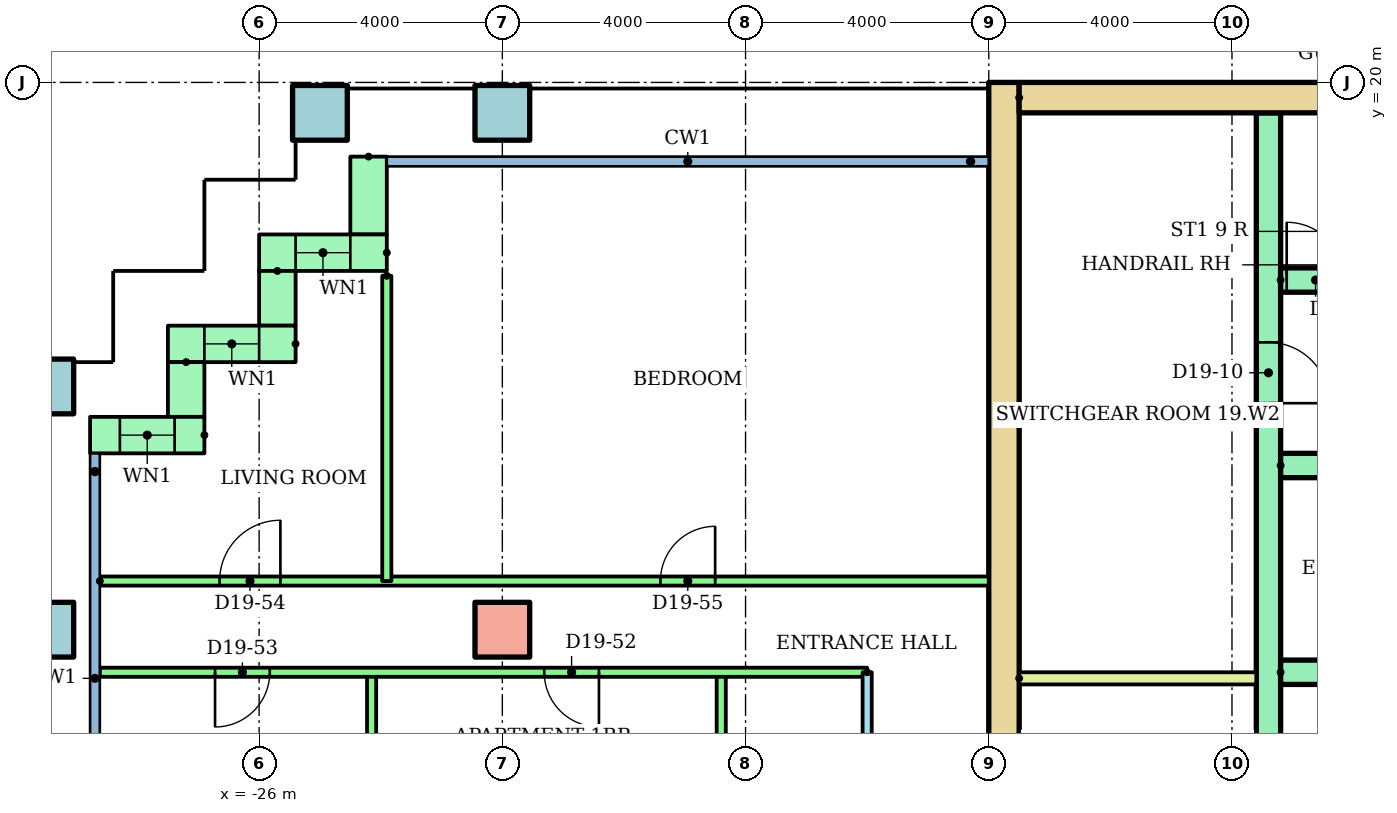
"""IFC4 building model, lengths in metres.
Left out: names, types, materials, properties, quantities, classifications, styles, units other than length and angle.
Written with IfcOpenShell. Run it as: python <this file> out.ifc"""

import sys

from ifc_helpers import new_model, si_unit, direction, frame, frame_2d, origin, origin_2d, place, context, subcontext, project, spatial, rectangle, hollow_rectangle, extrude, element, fill, save


model = new_model("IFC4")
c1 = context("Model", 3, precision=1e-05, world=origin(), true_north=direction((0.0, 1.0)))
c2 = subcontext(c1, "Body", "Model", "MODEL_VIEW")
j1 = project(units=[si_unit("LENGTHUNIT", "METRE"), si_unit("PLANEANGLEUNIT", "RADIAN")], contexts=[c1])
p1 = place(None, origin())
s1 = spatial("IfcSite", under=j1, at=p1, CompositionType="ELEMENT")
p2 = place(p1, origin())
s2 = spatial("IfcBuilding", under=s1, at=p2, CompositionType="ELEMENT")
p3 = place(p2, frame((0.0, 0.0, 77.5)))
s3 = spatial("IfcBuildingStorey", under=s2, at=p3, CompositionType="ELEMENT", Elevation=77.5)
p4 = place(p3, frame((-29.5, 11.0, 0.0)))
e1 = element("IfcColumn", 1, at=p4, inside=s3, PredefinedType="COLUMN", context=c2, shape_type="SweptSolid", body=[
    extrude(hollow_rectangle(XDim=0.9, YDim=0.9, WallThickness=0.045, at=origin_2d()), origin(), (0.0, 0.0, 1.0), 3.2),
])
p5 = place(p3, frame((-22.0, 11.0, 0.0)))
e2 = element("IfcColumn", 2, at=p5, inside=s3, PredefinedType="COLUMN", context=c2, shape_type="SweptSolid", body=[
    extrude(rectangle(XDim=0.9, YDim=0.9, at=origin_2d()), origin(), (0.0, 0.0, 1.0), 3.2),
])
for number, where in (
    (3, (-29.5, 15.0, 0.0)),
    (4, (-25.0, 19.5, 0.0)),
    (5, (-22.0, 19.5, 0.0)),
):
    element("IfcColumn", number, at=place(p3, frame(where)), inside=s3, PredefinedType="COLUMN", context=c2, shape_type="SweptSolid", body=[
        extrude(hollow_rectangle(XDim=0.9, YDim=0.9, WallThickness=0.045, at=origin_2d()), origin(), (0.0, 0.0, 1.0), 3.2),
    ])
p6 = place(p3, frame((-24.2, 18.78, 0.0), z_axis=(0.0, 0.0, 1.0), x_axis=(0.0, -1.0, 0.0)))
e6 = element("IfcWall", 6, at=p6, inside=s3, PredefinedType="STANDARD", context=c2, shape_type="SweptSolid", body=[
    extrude(rectangle(XDim=1.28, YDim=0.6, at=frame_2d((0.64, 0.0))), origin(), (0.0, 0.0, 1.0), 2.92),
])
p7 = place(p3, frame((-23.9, 17.2, 0.0), z_axis=(0.0, 0.0, 1.0), x_axis=(-1.0, 0.0, 0.0)))
e7 = element("IfcWall", 7, at=p7, inside=s3, PredefinedType="STANDARD", context=c2, shape_type="SweptSolid", body=[
    extrude(rectangle(XDim=2.1, YDim=0.6, at=frame_2d((1.05, 0.0))), origin(), (0.0, 0.0, 1.0), 2.92),
])
p8 = place(p7, frame((0.6, 0.0, 0.9)))
e8 = element("IfcOpeningElement", 8, at=p8, cuts=e7, PredefinedType="OPENING", context=c2, shape_type="SweptSolid", body=[
    extrude(rectangle(XDim=0.9, YDim=1.5, at=frame_2d((0.45, 0.75))), frame((0.0, 0.31, 0.0), z_axis=(0.0, -1.0, 0.0), x_axis=(1.0, 0.0, 0.0)), (0.0, 0.0, 1.0), 0.62),
])
p9 = place(p3, frame((-25.7, 16.9, 0.0), z_axis=(0.0, 0.0, 1.0), x_axis=(0.0, -1.0, 0.0)))
e9 = element("IfcWall", 9, at=p9, inside=s3, PredefinedType="STANDARD", context=c2, shape_type="SweptSolid", body=[
    extrude(rectangle(XDim=0.9, YDim=0.6, at=frame_2d((0.45, 0.0))), origin(), (0.0, 0.0, 1.0), 2.92),
])
p10 = place(p3, frame((-25.4, 15.7, 0.0), z_axis=(0.0, 0.0, 1.0), x_axis=(-1.0, 0.0, 0.0)))
e10 = element("IfcWall", 10, at=p10, inside=s3, PredefinedType="STANDARD", context=c2, shape_type="SweptSolid", body=[
    extrude(rectangle(XDim=2.1, YDim=0.6, at=frame_2d((1.05, 0.0))), origin(), (0.0, 0.0, 1.0), 2.92),
])
p11 = place(p10, frame((0.6, 0.0, 0.9)))
e11 = element("IfcOpeningElement", 11, at=p11, cuts=e10, PredefinedType="OPENING", context=c2, shape_type="SweptSolid", body=[
    extrude(rectangle(XDim=0.9, YDim=1.5, at=frame_2d((0.45, 0.75))), frame((0.0, 0.31, 0.0), z_axis=(0.0, -1.0, 0.0), x_axis=(1.0, 0.0, 0.0)), (0.0, 0.0, 1.0), 0.62),
])
p12 = place(p3, frame((-27.2, 15.4, 0.0), z_axis=(0.0, 0.0, 1.0), x_axis=(0.0, -1.0, 0.0)))
e12 = element("IfcWall", 12, at=p12, inside=s3, PredefinedType="STANDARD", context=c2, shape_type="SweptSolid", body=[
    extrude(rectangle(XDim=0.9, YDim=0.6, at=frame_2d((0.45, 0.0))), origin(), (0.0, 0.0, 1.0), 2.92),
])
p13 = place(p3, frame((-26.9, 14.2, 0.0), z_axis=(0.0, 0.0, 1.0), x_axis=(-1.0, 0.0, 0.0)))
e13 = element("IfcWall", 13, at=p13, inside=s3, PredefinedType="STANDARD", context=c2, shape_type="SweptSolid", body=[
    extrude(rectangle(XDim=1.88, YDim=0.6, at=frame_2d((0.94, 0.0))), origin(), (0.0, 0.0, 1.0), 2.92),
])
p14 = place(p13, frame((0.49, 0.0, 0.9)))
e14 = element("IfcOpeningElement", 14, at=p14, cuts=e13, PredefinedType="OPENING", context=c2, shape_type="SweptSolid", body=[
    extrude(rectangle(XDim=0.9, YDim=1.5, at=frame_2d((0.45, 0.75))), frame((0.0, 0.31, 0.0), z_axis=(0.0, -1.0, 0.0), x_axis=(1.0, 0.0, 0.0)), (0.0, 0.0, 1.0), 0.62),
])
p15 = place(p3, frame((-13.75, 3.0, 0.0), z_axis=(0.0, 0.0, 1.0), x_axis=(0.0, 1.0, 0.0)))
e15 = element("IfcWall", 15, at=p15, inside=s3, PredefinedType="SHEAR", context=c2, shape_type="SweptSolid", body=[
    extrude(rectangle(XDim=17.0, YDim=0.5, at=frame_2d((8.5, 0.0))), origin(), (0.0, 0.0, 1.0), 2.92),
])
p16 = place(p3, frame((-13.5, 19.75, 0.0)))
e16 = element("IfcWall", 16, at=p16, inside=s3, PredefinedType="SHEAR", context=c2, shape_type="SweptSolid", body=[
    extrude(rectangle(XDim=27.0, YDim=0.5, at=frame_2d((13.5, 0.0))), origin(), (0.0, 0.0, 1.0), 2.92),
])
p17 = place(p3, frame((-9.4, 6.8, 0.0), z_axis=(0.0, 0.0, 1.0), x_axis=(0.0, 1.0, 0.0)))
e17 = element("IfcWall", 17, at=p17, inside=s3, PredefinedType="SHEAR", context=c2, shape_type="SweptSolid", body=[
    extrude(rectangle(XDim=12.7, YDim=0.4, at=frame_2d((6.35, 0.0))), origin(), (0.0, 0.0, 1.0), 2.92),
])
p18 = place(p17, frame((1.15, 0.0, 0.0)))
e18 = element("IfcOpeningElement", 18, at=p18, cuts=e17, PredefinedType="OPENING", context=c2, shape_type="SweptSolid", body=[
    extrude(rectangle(XDim=1.0, YDim=2.1, at=frame_2d((0.5, 1.05))), frame((0.0, 0.21, 0.0), z_axis=(0.0, -1.0, 0.0), x_axis=(1.0, 0.0, 0.0)), (0.0, 0.0, 1.0), 0.42),
])
p19 = place(p17, frame((7.925, 0.0, 0.0)))
e19 = element("IfcOpeningElement", 19, at=p19, cuts=e17, PredefinedType="OPENING", context=c2, shape_type="SweptSolid", body=[
    extrude(rectangle(XDim=1.0, YDim=2.1, at=frame_2d((0.5, 1.05))), frame((0.0, 0.21, 0.0), z_axis=(0.0, -1.0, 0.0), x_axis=(1.0, 0.0, 0.0)), (0.0, 0.0, 1.0), 0.42),
])
p20 = place(p3, frame((-9.2, 10.3, 0.0)))
e20 = element("IfcWall", 20, at=p20, inside=s3, PredefinedType="SHEAR", context=c2, shape_type="SweptSolid", body=[
    extrude(rectangle(XDim=8.0, YDim=0.4, at=frame_2d((4.0, 0.0))), origin(), (0.0, 0.0, 1.0), 2.92),
])
p21 = place(p20, frame((2.033, 0.0, 0.0)))
e21 = element("IfcOpeningElement", 21, at=p21, cuts=e20, PredefinedType="OPENING", context=c2, shape_type="SweptSolid", body=[
    extrude(rectangle(XDim=1.0, YDim=2.1, at=frame_2d((0.5, 1.05))), frame((0.0, 0.21, 0.0), z_axis=(0.0, -1.0, 0.0), x_axis=(1.0, 0.0, 0.0)), (0.0, 0.0, 1.0), 0.42),
])
p22 = place(p20, frame((6.133, 0.0, 0.0)))
e22 = element("IfcOpeningElement", 22, at=p22, cuts=e20, PredefinedType="OPENING", context=c2, shape_type="SweptSolid", body=[
    extrude(rectangle(XDim=1.0, YDim=2.1, at=frame_2d((0.5, 1.05))), frame((0.0, 0.21, 0.0), z_axis=(0.0, -1.0, 0.0), x_axis=(1.0, 0.0, 0.0)), (0.0, 0.0, 1.0), 0.42),
])
p23 = place(p3, frame((-9.2, 13.7, 0.0)))
e23 = element("IfcWall", 23, at=p23, inside=s3, PredefinedType="SHEAR", context=c2, shape_type="SweptSolid", body=[
    extrude(rectangle(XDim=8.0, YDim=0.4, at=frame_2d((4.0, 0.0))), origin(), (0.0, 0.0, 1.0), 2.92),
])
p24 = place(p3, frame((-9.2, 16.75, 0.0)))
e24 = element("IfcWall", 24, at=p24, inside=s3, PredefinedType="SHEAR", context=c2, shape_type="SweptSolid", body=[
    extrude(rectangle(XDim=18.4, YDim=0.4, at=frame_2d((9.2, 0.0))), origin(), (0.0, 0.0, 1.0), 2.92),
])
p25 = place(p24, frame((0.1, 0.0, 0.0)))
e25 = element("IfcOpeningElement", 25, at=p25, cuts=e24, PredefinedType="OPENING", context=c2, shape_type="SweptSolid", body=[
    extrude(rectangle(XDim=0.95, YDim=2.1, at=frame_2d((0.475, 1.05))), frame((0.0, 0.21, 0.0), z_axis=(0.0, -1.0, 0.0), x_axis=(1.0, 0.0, 0.0)), (0.0, 0.0, 1.0), 0.42),
])
p26 = place(p24, frame((6.1, 0.0, 0.0)))
e26 = element("IfcOpeningElement", 26, at=p26, cuts=e24, PredefinedType="OPENING", context=c2, shape_type="SweptSolid", body=[
    extrude(rectangle(XDim=0.95, YDim=2.1, at=frame_2d((0.475, 1.05))), frame((0.0, 0.21, 0.0), z_axis=(0.0, -1.0, 0.0), x_axis=(1.0, 0.0, 0.0)), (0.0, 0.0, 1.0), 0.42),
])
p27 = place(p24, frame((12.1, 0.0, 0.0)))
e27 = element("IfcOpeningElement", 27, at=p27, cuts=e24, PredefinedType="OPENING", context=c2, shape_type="SweptSolid", body=[
    extrude(rectangle(XDim=0.95, YDim=2.1, at=frame_2d((0.475, 1.05))), frame((0.0, 0.21, 0.0), z_axis=(0.0, -1.0, 0.0), x_axis=(1.0, 0.0, 0.0)), (0.0, 0.0, 1.0), 0.42),
])
p28 = place(p3, frame((-13.5, 10.2, 0.0)))
e28 = element("IfcWall", 28, at=p28, inside=s3, PredefinedType="PARTITIONING", context=c2, shape_type="SweptSolid", body=[
    extrude(rectangle(XDim=3.9, YDim=0.2, at=frame_2d((1.95, 0.0))), origin(), (0.0, 0.0, 1.0), 2.92),
])
p29 = place(p3, frame((-16.0, 1.4, 0.0), z_axis=(0.0, 0.0, 1.0), x_axis=(0.0, 1.0, 0.0)))
e29 = element("IfcWall", 29, at=p29, inside=s3, PredefinedType="PARTITIONING", context=c2, shape_type="SweptSolid", body=[
    extrude(rectangle(XDim=8.9, YDim=0.15, at=frame_2d((4.45, 0.0))), origin(), (0.0, 0.0, 1.0), 2.4),
])
p30 = place(p29, frame((2.05, 0.0, 0.0)))
e30 = element("IfcOpeningElement", 30, at=p30, cuts=e29, PredefinedType="OPENING", context=c2, shape_type="SweptSolid", body=[
    extrude(rectangle(XDim=0.9, YDim=2.1, at=frame_2d((0.45, 1.05))), frame((0.0, 0.085, 0.0), z_axis=(0.0, -1.0, 0.0), x_axis=(1.0, 0.0, 0.0)), (0.0, 0.0, 1.0), 0.17),
])
p31 = place(p29, frame((6.55, 0.0, 0.0)))
e31 = element("IfcOpeningElement", 31, at=p31, cuts=e29, PredefinedType="OPENING", context=c2, shape_type="SweptSolid", body=[
    extrude(rectangle(XDim=0.8, YDim=2.1, at=frame_2d((0.4, 1.05))), frame((0.0, 0.085, 0.0), z_axis=(0.0, -1.0, 0.0), x_axis=(1.0, 0.0, 0.0)), (0.0, 0.0, 1.0), 0.17),
])
for number, where, z_axis, x_axis in (
    (32, (-18.4, 1.4, 0.0), (0.0, 0.0, 1.0), (0.0, 1.0, 0.0)),
    (33, (-24.15, 1.4, 0.0), (0.0, 0.0, 1.0), (0.0, 1.0, 0.0)),
):
    element("IfcWall", number, at=place(p3, frame(where, z_axis=z_axis, x_axis=x_axis)), inside=s3, PredefinedType="PARTITIONING", context=c2, shape_type="SweptSolid", body=[
        extrude(rectangle(XDim=8.9, YDim=0.15, at=frame_2d((4.45, 0.0))), origin(), (0.0, 0.0, 1.0), 2.4),
    ])
p32 = place(p3, frame((-16.0, 10.3, 0.0), z_axis=(0.0, 0.0, 1.0), x_axis=(-1.0, 0.0, 0.0)))
e34 = element("IfcWall", 34, at=p32, inside=s3, PredefinedType="PARTITIONING", context=c2, shape_type="SweptSolid", body=[
    extrude(rectangle(XDim=12.62, YDim=0.15, at=frame_2d((6.31, 0.0))), origin(), (0.0, 0.0, 1.0), 2.4),
])
p33 = place(p32, frame((4.411, 0.0, 0.0)))
e35 = element("IfcOpeningElement", 35, at=p33, cuts=e34, PredefinedType="OPENING", context=c2, shape_type="SweptSolid", body=[
    extrude(rectangle(XDim=0.9, YDim=2.1, at=frame_2d((0.45, 1.05))), frame((0.0, 0.085, 0.0), z_axis=(0.0, -1.0, 0.0), x_axis=(1.0, 0.0, 0.0)), (0.0, 0.0, 1.0), 0.17),
])
p34 = place(p32, frame((9.825, 0.0, 0.0)))
e36 = element("IfcOpeningElement", 36, at=p34, cuts=e34, PredefinedType="OPENING", context=c2, shape_type="SweptSolid", body=[
    extrude(rectangle(XDim=0.9, YDim=2.1, at=frame_2d((0.45, 1.05))), frame((0.0, 0.085, 0.0), z_axis=(0.0, -1.0, 0.0), x_axis=(1.0, 0.0, 0.0)), (0.0, 0.0, 1.0), 0.17),
])
p35 = place(p3, frame((-28.62, 11.8, 0.0)))
e37 = element("IfcWall", 37, at=p35, inside=s3, PredefinedType="PARTITIONING", context=c2, shape_type="SweptSolid", body=[
    extrude(rectangle(XDim=14.62, YDim=0.15, at=frame_2d((7.31, 0.0))), origin(), (0.0, 0.0, 1.0), 2.4),
])
p36 = place(p35, frame((1.97, 0.0, 0.0)))
e38 = element("IfcOpeningElement", 38, at=p36, cuts=e37, PredefinedType="OPENING", context=c2, shape_type="SweptSolid", body=[
    extrude(rectangle(XDim=1.0, YDim=2.1, at=frame_2d((0.5, 1.05))), frame((0.0, 0.085, 0.0), z_axis=(0.0, -1.0, 0.0), x_axis=(1.0, 0.0, 0.0)), (0.0, 0.0, 1.0), 0.17),
])
p37 = place(p35, frame((9.22, 0.0, 0.0)))
e39 = element("IfcOpeningElement", 39, at=p37, cuts=e37, PredefinedType="OPENING", context=c2, shape_type="SweptSolid", body=[
    extrude(rectangle(XDim=0.9, YDim=2.1, at=frame_2d((0.45, 1.05))), frame((0.0, 0.085, 0.0), z_axis=(0.0, -1.0, 0.0), x_axis=(1.0, 0.0, 0.0)), (0.0, 0.0, 1.0), 0.17),
])
p38 = place(p3, frame((-23.9, 16.82, 0.0), z_axis=(0.0, 0.0, 1.0), x_axis=(0.0, -1.0, 0.0)))
e40 = element("IfcWall", 40, at=p38, inside=s3, PredefinedType="PARTITIONING", context=c2, shape_type="SweptSolid", body=[
    extrude(rectangle(XDim=5.02, YDim=0.15, at=frame_2d((2.51, 0.0))), origin(), (0.0, 0.0, 1.0), 2.4),
])
p39 = place(p8, origin())
e41 = element("IfcWindow", 41, at=p39, inside=s3, PartitioningType="SINGLE_PANEL", PredefinedType="WINDOW", context=c2, shape_type="SweptSolid", body=[
    extrude(rectangle(XDim=0.9, YDim=1.5, at=frame_2d((0.45, 0.75))), frame((0.0, 0.03, 0.0), z_axis=(0.0, -1.0, 0.0), x_axis=(1.0, 0.0, 0.0)), (0.0, 0.0, 1.0), 0.06),
])
fill(e8, e41)
p40 = place(p11, origin())
e42 = element("IfcWindow", 42, at=p40, inside=s3, PartitioningType="SINGLE_PANEL", PredefinedType="WINDOW", context=c2, shape_type="SweptSolid", body=[
    extrude(rectangle(XDim=0.9, YDim=1.5, at=frame_2d((0.45, 0.75))), frame((0.0, 0.03, 0.0), z_axis=(0.0, -1.0, 0.0), x_axis=(1.0, 0.0, 0.0)), (0.0, 0.0, 1.0), 0.06),
])
fill(e11, e42)
p41 = place(p14, origin())
e43 = element("IfcWindow", 43, at=p41, inside=s3, PartitioningType="SINGLE_PANEL", PredefinedType="WINDOW", context=c2, shape_type="SweptSolid", body=[
    extrude(rectangle(XDim=0.9, YDim=1.5, at=frame_2d((0.45, 0.75))), frame((0.0, 0.03, 0.0), z_axis=(0.0, -1.0, 0.0), x_axis=(1.0, 0.0, 0.0)), (0.0, 0.0, 1.0), 0.06),
])
fill(e14, e43)
p42 = place(p25, origin())
e44 = element("IfcDoor", 44, at=p42, inside=s3, OperationType="SINGLE_SWING_LEFT", PredefinedType="DOOR", context=c2, shape_type="SweptSolid", body=[
    extrude(rectangle(XDim=0.95, YDim=2.1, at=frame_2d((0.475, 1.05))), frame((0.0, 0.025, 0.0), z_axis=(0.0, -1.0, 0.0), x_axis=(1.0, 0.0, 0.0)), (0.0, 0.0, 1.0), 0.05),
])
fill(e25, e44)
p43 = place(p19, frame((1.0, 0.0, 0.0), z_axis=(0.0, 0.0, 1.0), x_axis=(-1.0, 0.0, 0.0)))
e45 = element("IfcDoor", 45, at=p43, inside=s3, OperationType="SINGLE_SWING_LEFT", PredefinedType="DOOR", context=c2, shape_type="SweptSolid", body=[
    extrude(rectangle(XDim=1.0, YDim=2.1, at=frame_2d((0.5, 1.05))), frame((0.0, 0.025, 0.0), z_axis=(0.0, -1.0, 0.0), x_axis=(1.0, 0.0, 0.0)), (0.0, 0.0, 1.0), 0.05),
])
fill(e19, e45)
p44 = place(p33, origin())
e46 = element("IfcDoor", 46, at=p44, inside=s3, OperationType="SINGLE_SWING_LEFT", PredefinedType="DOOR", context=c2, shape_type="SweptSolid", body=[
    extrude(rectangle(XDim=0.9, YDim=2.1, at=frame_2d((0.45, 1.05))), frame((0.0, 0.025, 0.0), z_axis=(0.0, -1.0, 0.0), x_axis=(1.0, 0.0, 0.0)), (0.0, 0.0, 1.0), 0.05),
])
fill(e35, e46)
p45 = place(p34, origin())
e47 = element("IfcDoor", 47, at=p45, inside=s3, OperationType="SINGLE_SWING_RIGHT", PredefinedType="DOOR", context=c2, shape_type="SweptSolid", body=[
    extrude(rectangle(XDim=0.9, YDim=2.1, at=frame_2d((0.45, 1.05))), frame((0.0, 0.025, 0.0), z_axis=(0.0, -1.0, 0.0), x_axis=(1.0, 0.0, 0.0)), (0.0, 0.0, 1.0), 0.05),
])
fill(e36, e47)
p46 = place(p36, origin())
e48 = element("IfcDoor", 48, at=p46, inside=s3, OperationType="SINGLE_SWING_RIGHT", PredefinedType="DOOR", context=c2, shape_type="SweptSolid", body=[
    extrude(rectangle(XDim=1.0, YDim=2.1, at=frame_2d((0.5, 1.05))), frame((0.0, 0.025, 0.0), z_axis=(0.0, -1.0, 0.0), x_axis=(1.0, 0.0, 0.0)), (0.0, 0.0, 1.0), 0.05),
])
fill(e38, e48)
p47 = place(p37, origin())
e49 = element("IfcDoor", 49, at=p47, inside=s3, OperationType="SINGLE_SWING_RIGHT", PredefinedType="DOOR", context=c2, shape_type="SweptSolid", body=[
    extrude(rectangle(XDim=0.9, YDim=2.1, at=frame_2d((0.45, 1.05))), frame((0.0, 0.025, 0.0), z_axis=(0.0, -1.0, 0.0), x_axis=(1.0, 0.0, 0.0)), (0.0, 0.0, 1.0), 0.05),
])
fill(e39, e49)
save(model, sys.argv[1])
